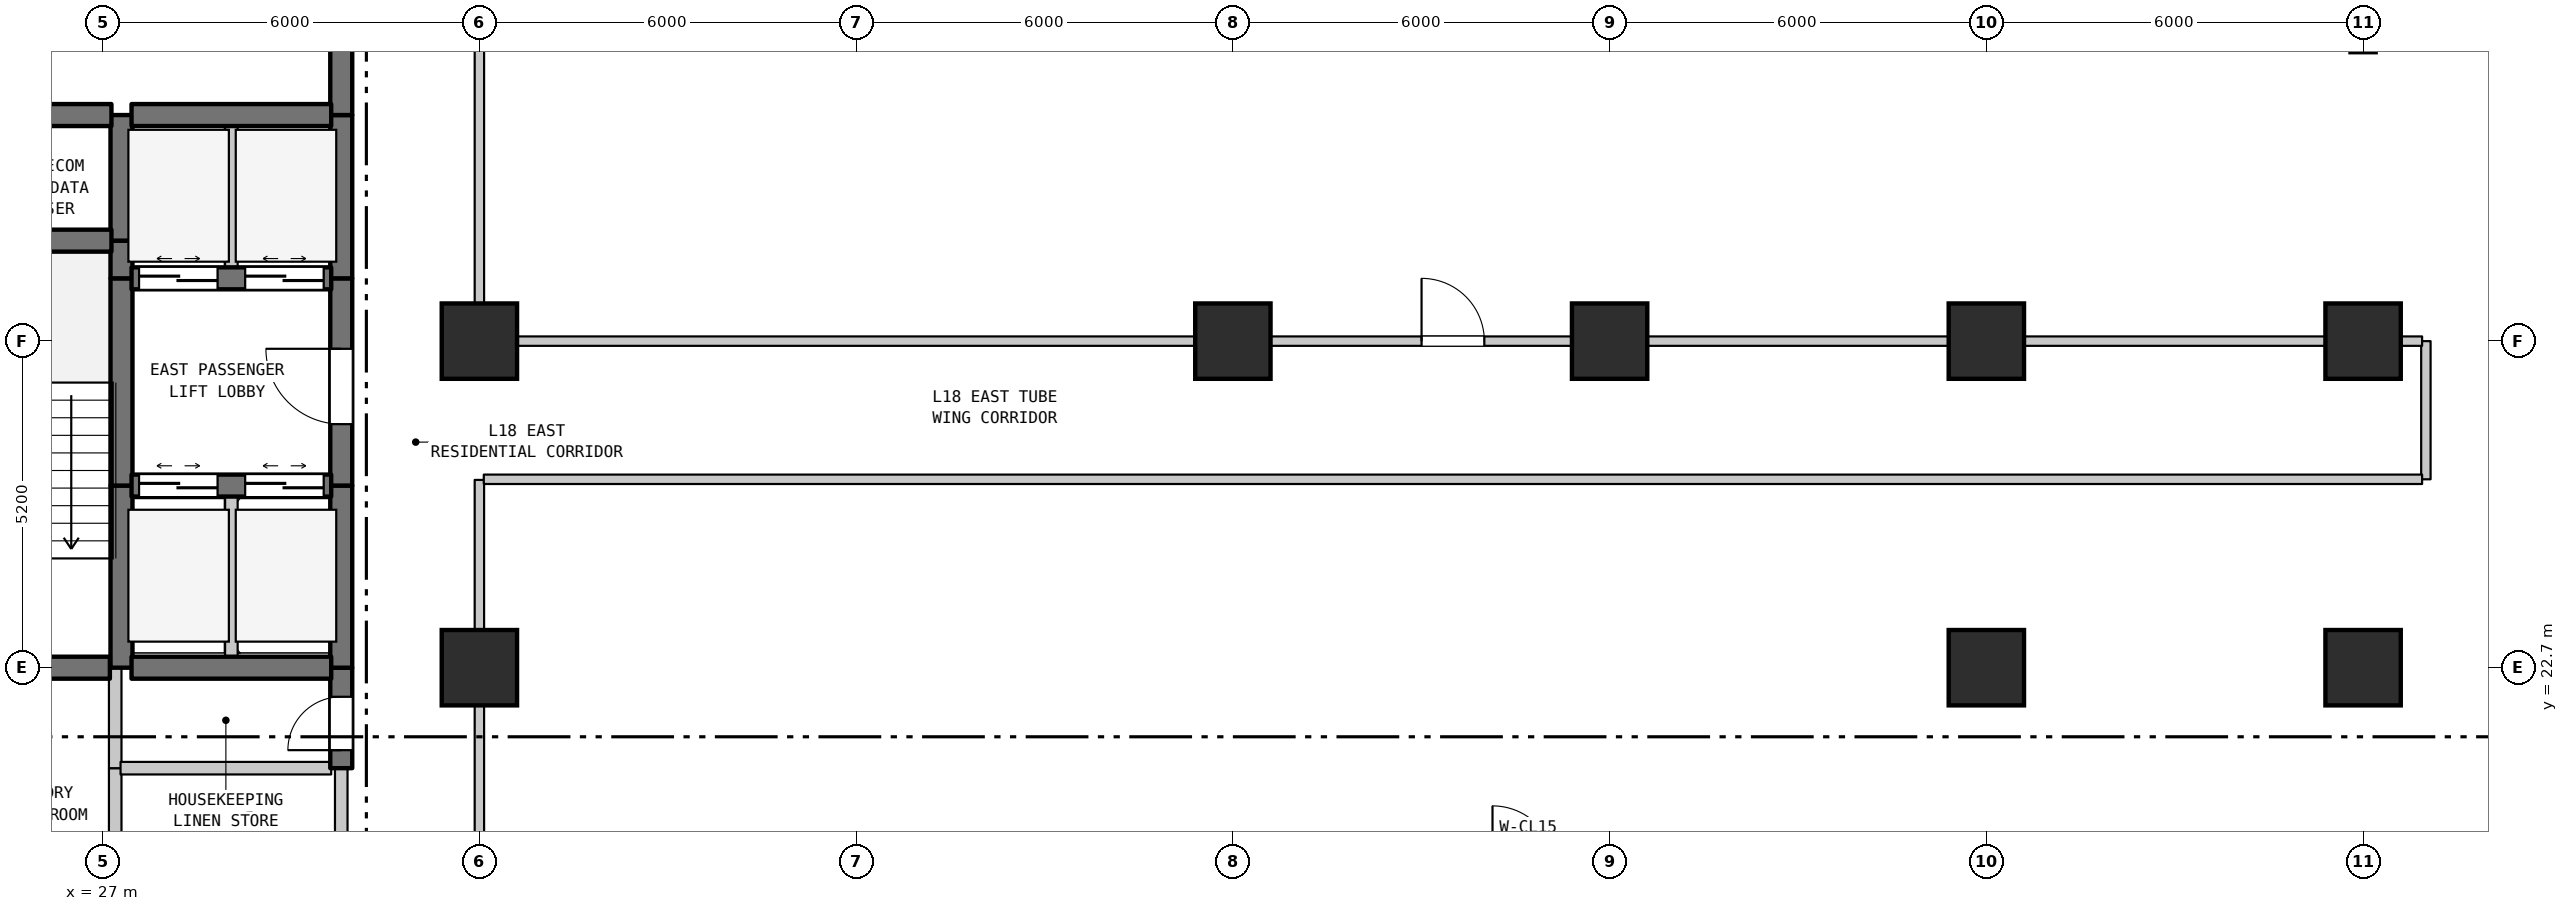
"""IFC4 building model, lengths in metres.
Left out: names, types, materials, properties, quantities, classifications, styles, units other than length and angle.
Written with IfcOpenShell. Run it as: python <this file> out.ifc"""

import sys

from ifc_helpers import new_model, si_unit, direction, frame, frame_2d, origin, origin_2d, place, context, subcontext, project, spatial, rectangle, extrude, element, fill, save


model = new_model("IFC4")
c1 = context("Model", 3, precision=1e-05, world=origin(), true_north=direction((0.0, 1.0)))
c2 = subcontext(c1, "Body", "Model", "MODEL_VIEW")
j1 = project(units=[si_unit("LENGTHUNIT", "METRE"), si_unit("PLANEANGLEUNIT", "RADIAN")], contexts=[c1])
p1 = place(None, origin())
s1 = spatial("IfcSite", under=j1, at=p1, CompositionType="ELEMENT")
p2 = place(p1, origin())
s2 = spatial("IfcBuilding", under=s1, at=p2, CompositionType="ELEMENT")
p3 = place(p2, frame((0.0, 0.0, 77.5)))
s3 = spatial("IfcBuildingStorey", under=s2, at=p3, CompositionType="ELEMENT", Elevation=77.5)
for number, where, z_axis, x_axis in (
    (1, (33.0, 22.7, 0.0), (0.0, 0.0, 1.0), (1.0, 0.0, 0.0)),
    (2, (33.0, 27.9, 0.0), (0.0, 0.0, 1.0), (1.0, 0.0, 0.0)),
    (3, (45.0, 27.9, 0.0), (0.0, 0.0, 1.0), (1.0, 0.0, 0.0)),
    (4, (51.0, 27.9, 0.0), (0.0, 0.0, 1.0), (1.0, 0.0, 0.0)),
    (5, (57.0, 22.7, 0.0), (0.0, 0.0, 1.0), (1.0, 0.0, 0.0)),
    (6, (57.0, 27.9, 0.0), (0.0, 0.0, 1.0), (1.0, 0.0, 0.0)),
    (7, (63.0, 22.7, 0.0), (0.0, 0.0, 1.0), (1.0, 0.0, 0.0)),
    (8, (63.0, 27.9, 0.0), (0.0, 0.0, 1.0), (1.0, 0.0, 0.0)),
):
    element("IfcColumn", number, at=place(p3, frame(where, z_axis=z_axis, x_axis=x_axis)), inside=s3, PredefinedType="COLUMN", context=c2, shape_type="SweptSolid", body=[
        extrude(rectangle(XDim=1.2, YDim=1.2, at=origin_2d()), origin(), (0.0, 0.0, 1.0), 3.7),
    ])
p4 = place(p3, frame((27.2, 19.5, 0.0), z_axis=(0.0, 0.0, 1.0), x_axis=(0.0, 1.0, 0.0)))
e9 = element("IfcWall", 9, at=p4, inside=s3, PredefinedType="STANDARD", context=c2, shape_type="SweptSolid", body=[
    extrude(rectangle(XDim=1.6, YDim=0.2, at=frame_2d((0.8, 0.0))), origin(), (0.0, 0.0, 1.0), 3.28),
])
p5 = place(p3, frame((27.2, 21.1, 0.0), z_axis=(0.0, 0.0, 1.0), x_axis=(0.0, 1.0, 0.0)))
e10 = element("IfcWall", 10, at=p5, inside=s3, PredefinedType="STANDARD", context=c2, shape_type="SweptSolid", body=[
    extrude(rectangle(XDim=1.6, YDim=0.2, at=frame_2d((0.8, 0.0))), origin(), (0.0, 0.0, 1.0), 3.28),
])
p6 = place(p3, frame((27.3, 22.7, 0.0), z_axis=(0.0, 0.0, 1.0), x_axis=(0.0, 1.0, 0.0)))
e11 = element("IfcWall", 11, at=p6, inside=s3, PredefinedType="SHEAR", context=c2, shape_type="SweptSolid", body=[
    extrude(rectangle(XDim=2.9, YDim=0.35, at=frame_2d((1.45, 0.0))), origin(), (0.0, 0.0, 1.0), 3.28),
])
p7 = place(p3, frame((27.3, 25.6, 0.0), z_axis=(0.0, 0.0, 1.0), x_axis=(0.0, 1.0, 0.0)))
e12 = element("IfcWall", 12, at=p7, inside=s3, PredefinedType="SHEAR", context=c2, shape_type="SweptSolid", body=[
    extrude(rectangle(XDim=3.3, YDim=0.35, at=frame_2d((1.65, 0.0))), origin(), (0.0, 0.0, 1.0), 3.28),
])
p8 = place(p3, frame((27.3, 28.9, 0.0), z_axis=(0.0, 0.0, 1.0), x_axis=(0.0, 1.0, 0.0)))
e13 = element("IfcWall", 13, at=p8, inside=s3, PredefinedType="SHEAR", context=c2, shape_type="SweptSolid", body=[
    extrude(rectangle(XDim=0.6, YDim=0.35, at=frame_2d((0.3, 0.0))), origin(), (0.0, 0.0, 1.0), 3.28),
])
p9 = place(p3, frame((27.3, 29.5, 0.0), z_axis=(0.0, 0.0, 1.0), x_axis=(0.0, 1.0, 0.0)))
e14 = element("IfcWall", 14, at=p9, inside=s3, PredefinedType="SHEAR", context=c2, shape_type="SweptSolid", body=[
    extrude(rectangle(XDim=2.0, YDim=0.35, at=frame_2d((1.0, 0.0))), origin(), (0.0, 0.0, 1.0), 3.28),
])
p10 = place(p3, frame((29.05, 22.7, 0.0), z_axis=(0.0, 0.0, 1.0), x_axis=(0.0, 1.0, 0.0)))
e15 = element("IfcWall", 15, at=p10, inside=s3, PredefinedType="STANDARD", context=c2, shape_type="SweptSolid", body=[
    extrude(rectangle(XDim=2.9, YDim=0.2, at=frame_2d((1.45, 0.0))), origin(), (0.0, 0.0, 1.0), 3.28),
])
p11 = place(p3, frame((29.05, 28.9, 0.0), z_axis=(0.0, 0.0, 1.0), x_axis=(0.0, 1.0, 0.0)))
e16 = element("IfcWall", 16, at=p11, inside=s3, PredefinedType="STANDARD", context=c2, shape_type="SweptSolid", body=[
    extrude(rectangle(XDim=2.6, YDim=0.2, at=frame_2d((1.3, 0.0))), origin(), (0.0, 0.0, 1.0), 3.28),
])
p12 = place(p3, frame((30.8, 19.5, 0.0), z_axis=(0.0, 0.0, 1.0), x_axis=(0.0, 1.0, 0.0)))
e17 = element("IfcWall", 17, at=p12, inside=s3, PredefinedType="STANDARD", context=c2, shape_type="SweptSolid", body=[
    extrude(rectangle(XDim=1.6, YDim=0.2, at=frame_2d((0.8, 0.0))), origin(), (0.0, 0.0, 1.0), 3.28),
])
p13 = place(p3, frame((30.8, 21.1, 0.0), z_axis=(0.0, 0.0, 1.0), x_axis=(0.0, 1.0, 0.0)))
e18 = element("IfcWall", 18, at=p13, inside=s3, PredefinedType="SHEAR", context=c2, shape_type="SweptSolid", body=[
    extrude(rectangle(XDim=1.6, YDim=0.35, at=frame_2d((0.8, 0.0))), origin(), (0.0, 0.0, 1.0), 3.28),
])
p14 = place(p13, frame((0.287, 0.0, 0.0)))
e19 = element("IfcOpeningElement", 19, at=p14, cuts=e18, PredefinedType="OPENING", context=c2, shape_type="SweptSolid", body=[
    extrude(rectangle(XDim=0.85, YDim=2.1, at=frame_2d((0.425, 1.05))), frame((0.0, 0.185, 0.0), z_axis=(0.0, -1.0, 0.0), x_axis=(1.0, 0.0, 0.0)), (0.0, 0.0, 1.0), 0.37),
])
p15 = place(p3, frame((30.8, 22.7, 0.0), z_axis=(0.0, 0.0, 1.0), x_axis=(0.0, 1.0, 0.0)))
e20 = element("IfcWall", 20, at=p15, inside=s3, PredefinedType="SHEAR", context=c2, shape_type="SweptSolid", body=[
    extrude(rectangle(XDim=2.9, YDim=0.35, at=frame_2d((1.45, 0.0))), origin(), (0.0, 0.0, 1.0), 3.28),
])
p16 = place(p3, frame((30.8, 25.6, 0.0), z_axis=(0.0, 0.0, 1.0), x_axis=(0.0, 1.0, 0.0)))
e21 = element("IfcWall", 21, at=p16, inside=s3, PredefinedType="SHEAR", context=c2, shape_type="SweptSolid", body=[
    extrude(rectangle(XDim=3.3, YDim=0.35, at=frame_2d((1.65, 0.0))), origin(), (0.0, 0.0, 1.0), 3.28),
])
p17 = place(p16, frame((0.978, 0.0, 0.0)))
e22 = element("IfcOpeningElement", 22, at=p17, cuts=e21, PredefinedType="OPENING", context=c2, shape_type="SweptSolid", body=[
    extrude(rectangle(XDim=1.2, YDim=2.2, at=frame_2d((0.6, 1.1))), frame((0.0, 0.185, 0.0), z_axis=(0.0, -1.0, 0.0), x_axis=(1.0, 0.0, 0.0)), (0.0, 0.0, 1.0), 0.37),
])
p18 = place(p3, frame((30.8, 28.9, 0.0), z_axis=(0.0, 0.0, 1.0), x_axis=(0.0, 1.0, 0.0)))
e23 = element("IfcWall", 23, at=p18, inside=s3, PredefinedType="SHEAR", context=c2, shape_type="SweptSolid", body=[
    extrude(rectangle(XDim=2.6, YDim=0.35, at=frame_2d((1.3, 0.0))), origin(), (0.0, 0.0, 1.0), 3.28),
])
p19 = place(p3, frame((30.8, 31.5, 0.0), z_axis=(0.0, 0.0, 1.0), x_axis=(0.0, 1.0, 0.0)))
e24 = element("IfcWall", 24, at=p19, inside=s3, PredefinedType="SHEAR", context=c2, shape_type="SweptSolid", body=[
    extrude(rectangle(XDim=3.5, YDim=0.35, at=frame_2d((1.75, 0.0))), origin(), (0.0, 0.0, 1.0), 3.28),
])
p20 = place(p19, frame((1.15, 0.0, 0.0)))
e25 = element("IfcOpeningElement", 25, at=p20, cuts=e24, PredefinedType="OPENING", context=c2, shape_type="SweptSolid", body=[
    extrude(rectangle(XDim=1.2, YDim=2.2, at=frame_2d((0.6, 1.1))), frame((0.0, 0.185, 0.0), z_axis=(0.0, -1.0, 0.0), x_axis=(1.0, 0.0, 0.0)), (0.0, 0.0, 1.0), 0.37),
])
p21 = place(p3, frame((33.0, 19.51, 0.0), z_axis=(0.0, 0.0, 1.0), x_axis=(0.0, 1.0, 0.0)))
e26 = element("IfcWall", 26, at=p21, inside=s3, PredefinedType="STANDARD", context=c2, shape_type="SweptSolid", body=[
    extrude(rectangle(XDim=6.18, YDim=0.15, at=frame_2d((3.09, 0.0))), origin(), (0.0, 0.0, 1.0), 2.78),
])
p22 = place(p3, frame((33.0, 27.91, 0.0), z_axis=(0.0, 0.0, 1.0), x_axis=(0.0, 1.0, 0.0)))
e27 = element("IfcWall", 27, at=p22, inside=s3, PredefinedType="STANDARD", context=c2, shape_type="SweptSolid", body=[
    extrude(rectangle(XDim=9.98, YDim=0.15, at=frame_2d((4.99, 0.0))), origin(), (0.0, 0.0, 1.0), 2.78),
])
p23 = place(p3, frame((64.0, 25.7, 0.0), z_axis=(0.0, 0.0, 1.0), x_axis=(0.0, 1.0, 0.0)))
e28 = element("IfcWall", 28, at=p23, inside=s3, PredefinedType="STANDARD", context=c2, shape_type="SweptSolid", body=[
    extrude(rectangle(XDim=2.2, YDim=0.15, at=frame_2d((1.1, 0.0))), origin(), (0.0, 0.0, 1.0), 3.28),
])
p24 = place(p3, frame((27.285, 21.1, 0.0), z_axis=(0.0, 0.0, 1.0), x_axis=(1.0, 0.0, 0.0)))
e29 = element("IfcWall", 29, at=p24, inside=s3, PredefinedType="STANDARD", context=c2, shape_type="SweptSolid", body=[
    extrude(rectangle(XDim=3.355, YDim=0.2, at=frame_2d((1.677, 0.0))), origin(), (0.0, 0.0, 1.0), 3.28),
])
p25 = place(p3, frame((23.96, 22.7, 0.0), z_axis=(0.0, 0.0, 1.0), x_axis=(1.0, 0.0, 0.0)))
e30 = element("IfcWall", 30, at=p25, inside=s3, PredefinedType="SHEAR", context=c2, shape_type="SweptSolid", body=[
    extrude(rectangle(XDim=3.155, YDim=0.35, at=frame_2d((1.578, 0.0))), origin(), (0.0, 0.0, 1.0), 3.28),
])
p26 = place(p3, frame((27.46, 22.7, 0.0), z_axis=(0.0, 0.0, 1.0), x_axis=(1.0, 0.0, 0.0)))
e31 = element("IfcWall", 31, at=p26, inside=s3, PredefinedType="SHEAR", context=c2, shape_type="SweptSolid", body=[
    extrude(rectangle(XDim=3.18, YDim=0.35, at=frame_2d((1.59, 0.0))), origin(), (0.0, 0.0, 1.0), 3.28),
])
p27 = place(p3, frame((27.46, 25.6, 0.0), z_axis=(0.0, 0.0, 1.0), x_axis=(1.0, 0.0, 0.0)))
e32 = element("IfcWall", 32, at=p27, inside=s3, PredefinedType="SHEAR", context=c2, shape_type="SweptSolid", body=[
    extrude(rectangle(XDim=3.18, YDim=0.35, at=frame_2d((1.59, 0.0))), origin(), (0.0, 0.0, 1.0), 3.28),
])
p28 = place(p27, frame((0.12, 0.0, 0.0)))
e33 = element("IfcOpeningElement", 33, at=p28, cuts=e32, PredefinedType="OPENING", context=c2, shape_type="SweptSolid", body=[
    extrude(rectangle(XDim=1.25, YDim=2.2, at=frame_2d((0.625, 1.1))), frame((0.0, 0.185, 0.0), z_axis=(0.0, -1.0, 0.0), x_axis=(1.0, 0.0, 0.0)), (0.0, 0.0, 1.0), 0.37),
])
p29 = place(p27, frame((1.81, 0.0, 0.0)))
e34 = element("IfcOpeningElement", 34, at=p29, cuts=e32, PredefinedType="OPENING", context=c2, shape_type="SweptSolid", body=[
    extrude(rectangle(XDim=1.25, YDim=2.2, at=frame_2d((0.625, 1.1))), frame((0.0, 0.185, 0.0), z_axis=(0.0, -1.0, 0.0), x_axis=(1.0, 0.0, 0.0)), (0.0, 0.0, 1.0), 0.37),
])
p30 = place(p3, frame((33.07, 25.7, 0.0), z_axis=(0.0, 0.0, 1.0), x_axis=(1.0, 0.0, 0.0)))
e35 = element("IfcWall", 35, at=p30, inside=s3, PredefinedType="STANDARD", context=c2, shape_type="SweptSolid", body=[
    extrude(rectangle(XDim=30.87, YDim=0.15, at=frame_2d((15.435, 0.0))), origin(), (0.0, 0.0, 1.0), 3.28),
])
p31 = place(p3, frame((33.07, 27.9, 0.0), z_axis=(0.0, 0.0, 1.0), x_axis=(1.0, 0.0, 0.0)))
e36 = element("IfcWall", 36, at=p31, inside=s3, PredefinedType="STANDARD", context=c2, shape_type="SweptSolid", body=[
    extrude(rectangle(XDim=30.87, YDim=0.15, at=frame_2d((15.435, 0.0))), origin(), (0.0, 0.0, 1.0), 2.68),
])
p32 = place(p31, frame((14.935, 0.0, 0.0)))
e37 = element("IfcOpeningElement", 37, at=p32, cuts=e36, PredefinedType="OPENING", context=c2, shape_type="SweptSolid", body=[
    extrude(rectangle(XDim=1.0, YDim=2.15, at=frame_2d((0.5, 1.075))), frame((0.0, 0.085, 0.0), z_axis=(0.0, -1.0, 0.0), x_axis=(1.0, 0.0, 0.0)), (0.0, 0.0, 1.0), 0.17),
])
p33 = place(p3, frame((27.46, 28.9, 0.0), z_axis=(0.0, 0.0, 1.0), x_axis=(1.0, 0.0, 0.0)))
e38 = element("IfcWall", 38, at=p33, inside=s3, PredefinedType="SHEAR", context=c2, shape_type="SweptSolid", body=[
    extrude(rectangle(XDim=3.18, YDim=0.35, at=frame_2d((1.59, 0.0))), origin(), (0.0, 0.0, 1.0), 3.28),
])
p34 = place(p33, frame((0.12, 0.0, 0.0)))
e39 = element("IfcOpeningElement", 39, at=p34, cuts=e38, PredefinedType="OPENING", context=c2, shape_type="SweptSolid", body=[
    extrude(rectangle(XDim=1.25, YDim=2.2, at=frame_2d((0.625, 1.1))), frame((0.0, 0.185, 0.0), z_axis=(0.0, -1.0, 0.0), x_axis=(1.0, 0.0, 0.0)), (0.0, 0.0, 1.0), 0.37),
])
p35 = place(p33, frame((1.81, 0.0, 0.0)))
e40 = element("IfcOpeningElement", 40, at=p35, cuts=e38, PredefinedType="OPENING", context=c2, shape_type="SweptSolid", body=[
    extrude(rectangle(XDim=1.25, YDim=2.2, at=frame_2d((0.625, 1.1))), frame((0.0, 0.185, 0.0), z_axis=(0.0, -1.0, 0.0), x_axis=(1.0, 0.0, 0.0)), (0.0, 0.0, 1.0), 0.37),
])
p36 = place(p3, frame((23.96, 29.5, 0.0), z_axis=(0.0, 0.0, 1.0), x_axis=(1.0, 0.0, 0.0)))
e41 = element("IfcWall", 41, at=p36, inside=s3, PredefinedType="SHEAR", context=c2, shape_type="SweptSolid", body=[
    extrude(rectangle(XDim=3.18, YDim=0.35, at=frame_2d((1.59, 0.0))), origin(), (0.0, 0.0, 1.0), 3.28),
])
p37 = place(p3, frame((23.96, 31.5, 0.0), z_axis=(0.0, 0.0, 1.0), x_axis=(1.0, 0.0, 0.0)))
e42 = element("IfcWall", 42, at=p37, inside=s3, PredefinedType="SHEAR", context=c2, shape_type="SweptSolid", body=[
    extrude(rectangle(XDim=3.18, YDim=0.35, at=frame_2d((1.59, 0.0))), origin(), (0.0, 0.0, 1.0), 3.28),
])
p38 = place(p37, frame((1.094, 0.0, 0.0)))
e43 = element("IfcOpeningElement", 43, at=p38, cuts=e42, PredefinedType="OPENING", context=c2, shape_type="SweptSolid", body=[
    extrude(rectangle(XDim=0.85, YDim=2.1, at=frame_2d((0.425, 1.05))), frame((0.0, 0.185, 0.0), z_axis=(0.0, -1.0, 0.0), x_axis=(1.0, 0.0, 0.0)), (0.0, 0.0, 1.0), 0.37),
])
p39 = place(p3, frame((27.46, 31.5, 0.0), z_axis=(0.0, 0.0, 1.0), x_axis=(1.0, 0.0, 0.0)))
e44 = element("IfcWall", 44, at=p39, inside=s3, PredefinedType="SHEAR", context=c2, shape_type="SweptSolid", body=[
    extrude(rectangle(XDim=3.18, YDim=0.35, at=frame_2d((1.59, 0.0))), origin(), (0.0, 0.0, 1.0), 3.28),
])
p40 = place(p14, origin())
e45 = element("IfcDoor", 45, at=p40, inside=s3, OperationType="SINGLE_SWING_LEFT", PredefinedType="DOOR", context=c2, shape_type="SweptSolid", body=[
    extrude(rectangle(XDim=0.85, YDim=2.1, at=frame_2d((0.425, 1.05))), frame((0.0, 0.025, 0.0), z_axis=(0.0, -1.0, 0.0), x_axis=(1.0, 0.0, 0.0)), (0.0, 0.0, 1.0), 0.05),
])
fill(e19, e45)
p41 = place(p17, origin())
e46 = element("IfcDoor", 46, at=p41, inside=s3, OperationType="SINGLE_SWING_RIGHT", PredefinedType="DOOR", context=c2, shape_type="SweptSolid", body=[
    extrude(rectangle(XDim=1.2, YDim=2.2, at=frame_2d((0.6, 1.1))), frame((0.0, 0.025, 0.0), z_axis=(0.0, -1.0, 0.0), x_axis=(1.0, 0.0, 0.0)), (0.0, 0.0, 1.0), 0.05),
])
fill(e22, e46)
p42 = place(p28, origin())
e47 = element("IfcDoor", 47, at=p42, inside=s3, OperationType="DOUBLE_DOOR_SLIDING", PredefinedType="DOOR", context=c2, shape_type="SweptSolid", body=[
    extrude(rectangle(XDim=1.25, YDim=2.2, at=frame_2d((0.625, 1.1))), frame((0.0, 0.025, 0.0), z_axis=(0.0, -1.0, 0.0), x_axis=(1.0, 0.0, 0.0)), (0.0, 0.0, 1.0), 0.05),
])
fill(e33, e47)
p43 = place(p29, origin())
e48 = element("IfcDoor", 48, at=p43, inside=s3, OperationType="DOUBLE_DOOR_SLIDING", PredefinedType="DOOR", context=c2, shape_type="SweptSolid", body=[
    extrude(rectangle(XDim=1.25, YDim=2.2, at=frame_2d((0.625, 1.1))), frame((0.0, 0.025, 0.0), z_axis=(0.0, -1.0, 0.0), x_axis=(1.0, 0.0, 0.0)), (0.0, 0.0, 1.0), 0.05),
])
fill(e34, e48)
p44 = place(p32, origin())
e49 = element("IfcDoor", 49, at=p44, inside=s3, OperationType="SINGLE_SWING_LEFT", PredefinedType="DOOR", context=c2, shape_type="SweptSolid", body=[
    extrude(rectangle(XDim=1.0, YDim=2.15, at=frame_2d((0.5, 1.075))), frame((0.0, 0.025, 0.0), z_axis=(0.0, -1.0, 0.0), x_axis=(1.0, 0.0, 0.0)), (0.0, 0.0, 1.0), 0.05),
])
fill(e37, e49)
p45 = place(p34, origin())
e50 = element("IfcDoor", 50, at=p45, inside=s3, OperationType="DOUBLE_DOOR_SLIDING", PredefinedType="DOOR", context=c2, shape_type="SweptSolid", body=[
    extrude(rectangle(XDim=1.25, YDim=2.2, at=frame_2d((0.625, 1.1))), frame((0.0, 0.025, 0.0), z_axis=(0.0, -1.0, 0.0), x_axis=(1.0, 0.0, 0.0)), (0.0, 0.0, 1.0), 0.05),
])
fill(e39, e50)
p46 = place(p35, origin())
e51 = element("IfcDoor", 51, at=p46, inside=s3, OperationType="DOUBLE_DOOR_SLIDING", PredefinedType="DOOR", context=c2, shape_type="SweptSolid", body=[
    extrude(rectangle(XDim=1.25, YDim=2.2, at=frame_2d((0.625, 1.1))), frame((0.0, 0.025, 0.0), z_axis=(0.0, -1.0, 0.0), x_axis=(1.0, 0.0, 0.0)), (0.0, 0.0, 1.0), 0.05),
])
fill(e40, e51)
save(model, sys.argv[1])
